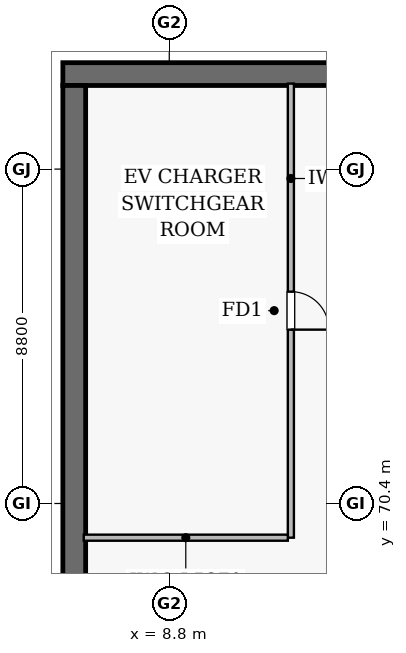
"""IFC4 building model, lengths in metres.
Left out: names, types, materials, properties, quantities, classifications, styles, units other than length and angle.
Written with IfcOpenShell. Run it as: python <this file> out.ifc"""

import sys

from ifc_helpers import new_model, si_unit, direction, frame, frame_2d, origin, place, context, subcontext, project, spatial, rectangle, extrude, element, fill, save


model = new_model("IFC4")
c1 = context("Model", 3, precision=1e-05, world=origin(), true_north=direction((0.0, 1.0)))
c2 = subcontext(c1, "Body", "Model", "MODEL_VIEW")
j1 = project(units=[si_unit("LENGTHUNIT", "METRE"), si_unit("PLANEANGLEUNIT", "RADIAN")], contexts=[c1])
p1 = place(None, origin())
s1 = spatial("IfcSite", under=j1, at=p1, CompositionType="ELEMENT")
p2 = place(p1, origin())
s2 = spatial("IfcBuilding", under=s1, at=p2, CompositionType="ELEMENT")
p3 = place(p2, frame((0.0, 0.0, -7.8)))
s3 = spatial("IfcBuildingStorey", under=s2, at=p3, CompositionType="ELEMENT", Elevation=-7.8)
p4 = place(p3, frame((82.0, 81.7, 0.0), z_axis=(0.0, 0.0, 1.0), x_axis=(-1.0, 0.0, 0.0)))
e1 = element("IfcWall", 1, at=p4, inside=s3, PredefinedType="SOLIDWALL", context=c2, shape_type="SweptSolid", body=[
    extrude(rectangle(XDim=76.0, YDim=0.6, at=frame_2d((38.0, 0.0))), origin(), (0.0, 0.0, 1.0), 3.58),
])
p5 = place(p3, frame((6.3, 81.4, 0.0), z_axis=(0.0, 0.0, 1.0), x_axis=(0.0, -1.0, 0.0)))
e2 = element("IfcWall", 2, at=p5, inside=s3, PredefinedType="SOLIDWALL", context=c2, shape_type="SweptSolid", body=[
    extrude(rectangle(XDim=74.8, YDim=0.6, at=frame_2d((37.4, 0.0))), origin(), (0.0, 0.0, 1.0), 3.58),
])
p6 = place(p3, frame((12.0, 81.45, 0.0), z_axis=(0.0, 0.0, 1.0), x_axis=(0.0, -1.0, 0.0)))
e3 = element("IfcWall", 3, at=p6, inside=s3, PredefinedType="SOLIDWALL", context=c2, shape_type="SweptSolid", body=[
    extrude(rectangle(XDim=11.95, YDim=0.16, at=frame_2d((5.975, 0.0))), origin(), (0.0, 0.0, 1.0), 3.58),
])
p7 = place(p6, frame((5.475, 0.0, 0.0)))
e4 = element("IfcOpeningElement", 4, at=p7, cuts=e3, PredefinedType="OPENING", context=c2, shape_type="SweptSolid", body=[
    extrude(rectangle(XDim=1.0, YDim=2.15, at=frame_2d((0.5, 1.075))), frame((0.0, 0.09, 0.0), z_axis=(0.0, -1.0, 0.0), x_axis=(1.0, 0.0, 0.0)), (0.0, 0.0, 1.0), 0.18),
])
p8 = place(p3, frame((11.92, 69.5, 0.0), z_axis=(0.0, 0.0, 1.0), x_axis=(-1.0, 0.0, 0.0)))
e5 = element("IfcWall", 5, at=p8, inside=s3, PredefinedType="SOLIDWALL", context=c2, shape_type="SweptSolid", body=[
    extrude(rectangle(XDim=5.37, YDim=0.16, at=frame_2d((2.685, 0.0))), origin(), (0.0, 0.0, 1.0), 3.58),
])
p9 = place(p7, origin())
e6 = element("IfcDoor", 6, at=p9, inside=s3, OperationType="SINGLE_SWING_RIGHT", PredefinedType="DOOR", context=c2, shape_type="SweptSolid", body=[
    extrude(rectangle(XDim=1.0, YDim=2.15, at=frame_2d((0.5, 1.075))), frame((0.0, 0.025, 0.0), z_axis=(0.0, -1.0, 0.0), x_axis=(1.0, 0.0, 0.0)), (0.0, 0.0, 1.0), 0.05),
])
fill(e4, e6)
save(model, sys.argv[1])
